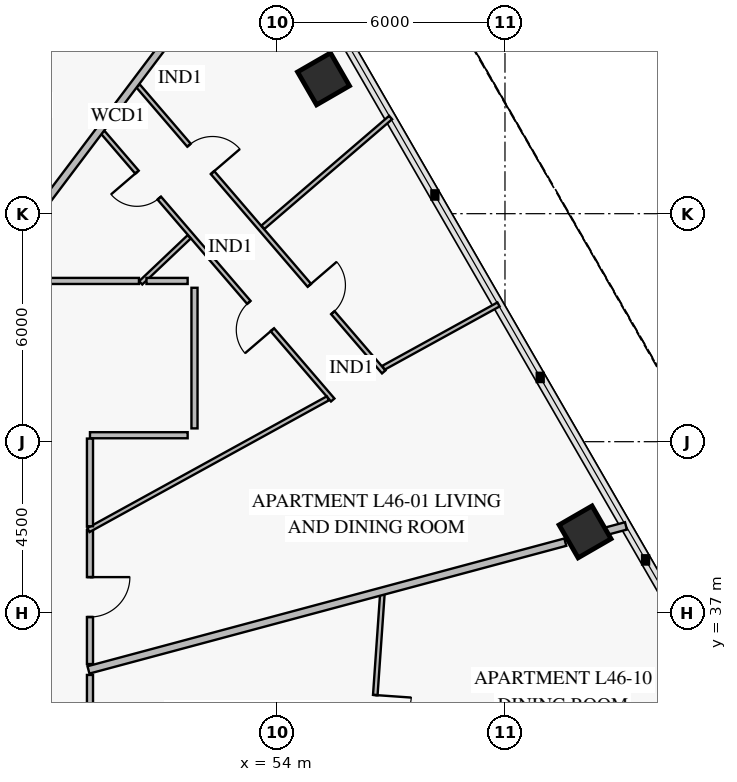
"""IFC4 building model, lengths in metres.
Left out: names, types, materials, properties, quantities, classifications, styles, units other than length and angle.
Written with IfcOpenShell. Run it as: python <this file> out.ifc"""

import sys

from ifc_helpers import new_model, si_unit, direction, frame, frame_2d, origin, origin_2d, place, context, subcontext, project, spatial, rectangle, extrude, element, fill, save


model = new_model("IFC4")
c1 = context("Model", 3, precision=1e-05, world=origin(), true_north=direction((0.0, 1.0)))
c2 = subcontext(c1, "Body", "Model", "MODEL_VIEW")
j1 = project(units=[si_unit("LENGTHUNIT", "METRE"), si_unit("PLANEANGLEUNIT", "RADIAN")], contexts=[c1])
p1 = place(None, origin())
s1 = spatial("IfcSite", under=j1, at=p1, CompositionType="ELEMENT")
p2 = place(p1, origin())
s2 = spatial("IfcBuilding", under=s1, at=p2, CompositionType="ELEMENT")
p3 = place(p2, frame((0.0, 0.0, 184.6)))
s3 = spatial("IfcBuildingStorey", under=s2, at=p3, CompositionType="ELEMENT", Elevation=184.6)
for number, where, z_axis, x_axis in (
    (1, (62.108, 39.126, 0.0), (0.0, 0.0, 1.0), (-0.5, 0.866, 0.0)),
    (2, (55.226, 51.047, 0.0), (0.0, 0.0, 1.0), (-0.5, 0.866, 0.0)),
):
    element("IfcColumn", number, at=place(p3, frame(where, z_axis=z_axis, x_axis=x_axis)), inside=s3, PredefinedType="COLUMN", context=c2, shape_type="SweptSolid", body=[
        extrude(rectangle(XDim=1.0, YDim=1.0, at=origin_2d()), origin(), (0.0, 0.0, 1.0), 3.55),
    ])
p4 = place(p3, frame((55.467, 42.597, 0.0), z_axis=(0.0, 0.0, 1.0), x_axis=(-0.651552756093, 0.758603325875, 0.0)))
e3 = element("IfcWall", 3, at=p4, inside=s3, PredefinedType="PARTITIONING", context=c2, shape_type="SweptSolid", body=[
    extrude(rectangle(XDim=9.291, YDim=0.12, at=frame_2d((4.646, 0.0))), origin(), (0.0, 0.0, 1.0), 2.9),
])
p5 = place(p4, frame((2.437, 0.0, 0.0)))
e4 = element("IfcOpeningElement", 4, at=p5, cuts=e3, PredefinedType="OPENING", context=c2, shape_type="SweptSolid", body=[
    extrude(rectangle(XDim=0.95, YDim=2.1, at=frame_2d((0.475, 1.05))), frame((0.0, 0.072, 0.0), z_axis=(0.0, -1.0, 0.0), x_axis=(1.0, 0.0, 0.0)), (0.0, 0.0, 1.0), 0.144),
])
p6 = place(p4, frame((7.005, 0.0, 0.0)))
e5 = element("IfcOpeningElement", 5, at=p6, cuts=e3, PredefinedType="OPENING", context=c2, shape_type="SweptSolid", body=[
    extrude(rectangle(XDim=0.9, YDim=2.1, at=frame_2d((0.45, 1.05))), frame((0.0, 0.072, 0.0), z_axis=(0.0, -1.0, 0.0), x_axis=(1.0, 0.0, 0.0)), (0.0, 0.0, 1.0), 0.144),
])
p7 = place(p3, frame((56.81, 43.336, 0.0), z_axis=(0.0, 0.0, 1.0), x_axis=(-0.651575392226, 0.75858388346, 0.0)))
e6 = element("IfcWall", 6, at=p7, inside=s3, PredefinedType="PARTITIONING", context=c2, shape_type="SweptSolid", body=[
    extrude(rectangle(XDim=9.92, YDim=0.12, at=frame_2d((4.96, 0.0))), origin(), (0.0, 0.0, 1.0), 2.9),
])
p8 = place(p7, frame((2.055, 0.0, 0.0)))
e7 = element("IfcOpeningElement", 7, at=p8, cuts=e6, PredefinedType="OPENING", context=c2, shape_type="SweptSolid", body=[
    extrude(rectangle(XDim=0.95, YDim=2.1, at=frame_2d((0.475, 1.05))), frame((0.0, 0.072, 0.0), z_axis=(0.0, -1.0, 0.0), x_axis=(1.0, 0.0, 0.0)), (0.0, 0.0, 1.0), 0.144),
])
p9 = place(p7, frame((6.915, 0.0, 0.0)))
e8 = element("IfcOpeningElement", 8, at=p9, cuts=e6, PredefinedType="OPENING", context=c2, shape_type="SweptSolid", body=[
    extrude(rectangle(XDim=0.95, YDim=2.1, at=frame_2d((0.475, 1.05))), frame((0.0, 0.072, 0.0), z_axis=(0.0, -1.0, 0.0), x_axis=(1.0, 0.0, 0.0)), (0.0, 0.0, 1.0), 0.144),
])
p10 = place(p3, frame((49.08, 35.648, 0.0), z_axis=(0.0, 0.0, 1.0), x_axis=(0.0, 1.0, 0.0)))
e9 = element("IfcWall", 9, at=p10, inside=s3, PredefinedType="PARTITIONING", context=c2, shape_type="SweptSolid", body=[
    extrude(rectangle(XDim=3.526, YDim=0.16, at=frame_2d((1.763, 0.0))), origin(), (0.0, 0.0, 1.0), 2.9),
])
p11 = place(p10, frame((1.238, 0.0, 0.0)))
e10 = element("IfcOpeningElement", 10, at=p11, cuts=e9, PredefinedType="OPENING", context=c2, shape_type="SweptSolid", body=[
    extrude(rectangle(XDim=1.05, YDim=2.15, at=frame_2d((0.525, 1.075))), frame((0.0, 0.092, 0.0), z_axis=(0.0, -1.0, 0.0), x_axis=(1.0, 0.0, 0.0)), (0.0, 0.0, 1.0), 0.184),
])
p12 = place(p3, frame((56.173, 28.906, 0.0), z_axis=(0.0, 0.0, 1.0), x_axis=(0.069768607492, 0.997563201711, 0.0)))
e11 = element("IfcWall", 11, at=p12, inside=s3, PredefinedType="PARTITIONING", context=c2, shape_type="SweptSolid", body=[
    extrude(rectangle(XDim=8.591, YDim=0.12, at=frame_2d((4.295, 0.0))), origin(), (0.0, 0.0, 1.0), 3.55),
])
p13 = place(p12, frame((0.936, 0.0, 0.0)))
e12 = element("IfcOpeningElement", 12, at=p13, cuts=e11, PredefinedType="OPENING", context=c2, shape_type="SweptSolid", body=[
    extrude(rectangle(XDim=0.95, YDim=2.1, at=frame_2d((0.475, 1.05))), frame((0.0, 0.072, 0.0), z_axis=(0.0, -1.0, 0.0), x_axis=(1.0, 0.0, 0.0)), (0.0, 0.0, 1.0), 0.144),
])
p14 = place(p12, frame((4.991, 0.0, 0.0)))
e13 = element("IfcOpeningElement", 13, at=p14, cuts=e11, PredefinedType="OPENING", context=c2, shape_type="SweptSolid", body=[
    extrude(rectangle(XDim=0.95, YDim=2.1, at=frame_2d((0.475, 1.05))), frame((0.0, 0.072, 0.0), z_axis=(0.0, -1.0, 0.0), x_axis=(1.0, 0.0, 0.0)), (0.0, 0.0, 1.0), 0.144),
])
p15 = place(p3, frame((49.08, 30.8, 0.0), z_axis=(0.0, 0.0, 1.0), x_axis=(0.0, 1.0, 0.0)))
e14 = element("IfcWall", 14, at=p15, inside=s3, PredefinedType="PARTITIONING", context=c2, shape_type="SweptSolid", body=[
    extrude(rectangle(XDim=4.562, YDim=0.16, at=frame_2d((2.281, 0.0))), origin(), (0.0, 0.0, 1.0), 3.55),
])
p16 = place(p15, frame((1.756, 0.0, 0.0)))
e15 = element("IfcOpeningElement", 15, at=p16, cuts=e14, PredefinedType="OPENING", context=c2, shape_type="SweptSolid", body=[
    extrude(rectangle(XDim=1.05, YDim=2.15, at=frame_2d((0.525, 1.075))), frame((0.0, 0.092, 0.0), z_axis=(0.0, -1.0, 0.0), x_axis=(1.0, 0.0, 0.0)), (0.0, 0.0, 1.0), 0.184),
])
p17 = place(p3, frame((49.04, 35.494, 0.0), z_axis=(0.0, 0.0, 1.0), x_axis=(0.965926995019, 0.258814683304, 0.0)))
e16 = element("IfcWall", 16, at=p17, inside=s3, PredefinedType="PARTITIONING", context=c2, shape_type="SweptSolid", body=[
    extrude(rectangle(XDim=12.99, YDim=0.2, at=frame_2d((6.495, 0.0))), origin(), (0.0, 0.0, 1.0), 2.9),
])
p18 = place(p3, frame((62.628, 39.135, 0.0), z_axis=(0.0, 0.0, 1.0), x_axis=(0.965881701481, 0.258983665013, 0.0)))
e17 = element("IfcWall", 17, at=p18, inside=s3, PredefinedType="PARTITIONING", context=c2, shape_type="SweptSolid", body=[
    extrude(rectangle(XDim=0.575, YDim=0.2, at=frame_2d((0.288, 0.0))), origin(), (0.0, 0.0, 1.0), 3.55),
])
p19 = place(p3, frame((50.415, 45.68, 0.0), z_axis=(0.0, 0.0, 1.0), x_axis=(0.725405017461, 0.688322279635, 0.0)))
e18 = element("IfcWall", 18, at=p19, inside=s3, PredefinedType="PARTITIONING", context=c2, shape_type="SweptSolid", body=[
    extrude(rectangle(XDim=1.758, YDim=0.12, at=frame_2d((0.879, 0.0))), origin(), (0.0, 0.0, 1.0), 3.15),
])
p20 = place(p3, frame((53.63, 47.143, 0.0), z_axis=(0.0, 0.0, 1.0), x_axis=(0.758610544746, 0.651544351062, 0.0)))
e19 = element("IfcWall", 19, at=p20, inside=s3, PredefinedType="PARTITIONING", context=c2, shape_type="SweptSolid", body=[
    extrude(rectangle(XDim=4.431, YDim=0.12, at=frame_2d((2.215, 0.0))), origin(), (0.0, 0.0, 1.0), 2.87),
])
p21 = place(p3, frame((49.038, 39.174, 0.0), z_axis=(0.0, 0.0, 1.0), x_axis=(0.876137059661, 0.482062083853, 0.0)))
e20 = element("IfcWall", 20, at=p21, inside=s3, PredefinedType="PARTITIONING", context=c2, shape_type="SweptSolid", body=[
    extrude(rectangle(XDim=7.192, YDim=0.12, at=frame_2d((3.596, 0.0))), origin(), (0.0, 0.0, 1.0), 3.15),
])
p22 = place(p3, frame((56.804, 43.447, 0.0), z_axis=(0.0, 0.0, 1.0), x_axis=(0.876100956411, 0.482127694886, 0.0)))
e21 = element("IfcWall", 21, at=p22, inside=s3, PredefinedType="PARTITIONING", context=c2, shape_type="SweptSolid", body=[
    extrude(rectangle(XDim=3.454, YDim=0.12, at=frame_2d((1.727, 0.0))), origin(), (0.0, 0.0, 1.0), 2.87),
])
p23 = place(p3, frame((46.316, 45.69, 0.0), z_axis=(0.0, 0.0, 1.0), x_axis=(0.601811441108, 0.798638209299, 0.0)))
e22 = element("IfcWall", 22, at=p23, inside=s3, PredefinedType="PARTITIONING", context=c2, shape_type="SweptSolid", body=[
    extrude(rectangle(XDim=12.389, YDim=0.2, at=frame_2d((6.194, 0.0))), origin(), (0.0, 0.0, 1.0), 2.87),
])
p24 = place(p3, frame((51.83, 41.85, 0.0), z_axis=(0.0, 0.0, 1.0), x_axis=(0.0, 1.0, 0.0)))
e23 = element("IfcWall", 23, at=p24, inside=s3, PredefinedType="PARTITIONING", context=c2, shape_type="SweptSolid", body=[
    extrude(rectangle(XDim=3.7, YDim=0.16, at=frame_2d((1.85, 0.0))), origin(), (0.0, 0.0, 1.0), 3.15),
])
p25 = place(p3, frame((49.08, 41.67, 0.0), z_axis=(0.0, 0.0, 1.0), x_axis=(1.0, 0.0, 0.0)))
e24 = element("IfcWall", 24, at=p25, inside=s3, PredefinedType="PARTITIONING", context=c2, shape_type="SweptSolid", body=[
    extrude(rectangle(XDim=2.57, YDim=0.16, at=frame_2d((1.285, 0.0))), origin(), (0.0, 0.0, 1.0), 3.55),
])
p26 = place(p3, frame((49.08, 39.274, 0.0), z_axis=(0.0, 0.0, 1.0), x_axis=(0.0, 1.0, 0.0)))
e25 = element("IfcWall", 25, at=p26, inside=s3, PredefinedType="PARTITIONING", context=c2, shape_type="SweptSolid", body=[
    extrude(rectangle(XDim=2.308, YDim=0.16, at=frame_2d((1.154, 0.0))), origin(), (0.0, 0.0, 1.0), 3.55),
])
p27 = place(p3, frame((51.65, 45.73, 0.0), z_axis=(0.0, 0.0, 1.0), x_axis=(-1.0, 0.0, 0.0)))
e26 = element("IfcWall", 26, at=p27, inside=s3, PredefinedType="PARTITIONING", context=c2, shape_type="SweptSolid", body=[
    extrude(rectangle(XDim=1.083, YDim=0.16, at=frame_2d((0.542, 0.0))), origin(), (0.0, 0.0, 1.0), 3.15),
])
p28 = place(p3, frame((50.369, 45.73, 0.0), z_axis=(0.0, 0.0, 1.0), x_axis=(-1.0, 0.0, 0.0)))
e27 = element("IfcWall", 27, at=p28, inside=s3, PredefinedType="PARTITIONING", context=c2, shape_type="SweptSolid", body=[
    extrude(rectangle(XDim=3.808, YDim=0.16, at=frame_2d((1.904, 0.0))), origin(), (0.0, 0.0, 1.0), 2.9),
])
p29 = place(p5, origin())
e28 = element("IfcDoor", 28, at=p29, inside=s3, OperationType="SINGLE_SWING_LEFT", PredefinedType="DOOR", context=c2, shape_type="SweptSolid", body=[
    extrude(rectangle(XDim=0.95, YDim=2.1, at=frame_2d((0.475, 1.05))), frame((0.0, 0.025, 0.0), z_axis=(0.0, -1.0, 0.0), x_axis=(1.0, 0.0, 0.0)), (0.0, 0.0, 1.0), 0.05),
])
fill(e4, e28)
p30 = place(p6, origin())
e29 = element("IfcDoor", 29, at=p30, inside=s3, OperationType="SINGLE_SWING_RIGHT", PredefinedType="DOOR", context=c2, shape_type="SweptSolid", body=[
    extrude(rectangle(XDim=0.9, YDim=2.1, at=frame_2d((0.45, 1.05))), frame((0.0, 0.025, 0.0), z_axis=(0.0, -1.0, 0.0), x_axis=(1.0, 0.0, 0.0)), (0.0, 0.0, 1.0), 0.05),
])
fill(e5, e29)
p31 = place(p8, frame((0.95, 0.0, 0.0), z_axis=(0.0, 0.0, 1.0), x_axis=(-1.0, 0.0, 0.0)))
e30 = element("IfcDoor", 30, at=p31, inside=s3, OperationType="SINGLE_SWING_LEFT", PredefinedType="DOOR", context=c2, shape_type="SweptSolid", body=[
    extrude(rectangle(XDim=0.95, YDim=2.1, at=frame_2d((0.475, 1.05))), frame((0.0, 0.025, 0.0), z_axis=(0.0, -1.0, 0.0), x_axis=(1.0, 0.0, 0.0)), (0.0, 0.0, 1.0), 0.05),
])
fill(e7, e30)
p32 = place(p9, frame((0.95, 0.0, 0.0), z_axis=(0.0, 0.0, 1.0), x_axis=(-1.0, 0.0, 0.0)))
e31 = element("IfcDoor", 31, at=p32, inside=s3, OperationType="SINGLE_SWING_RIGHT", PredefinedType="DOOR", context=c2, shape_type="SweptSolid", body=[
    extrude(rectangle(XDim=0.95, YDim=2.1, at=frame_2d((0.475, 1.05))), frame((0.0, 0.025, 0.0), z_axis=(0.0, -1.0, 0.0), x_axis=(1.0, 0.0, 0.0)), (0.0, 0.0, 1.0), 0.05),
])
fill(e8, e31)
p33 = place(p11, frame((1.05, 0.0, 0.0), z_axis=(0.0, 0.0, 1.0), x_axis=(-1.0, 0.0, 0.0)))
e32 = element("IfcDoor", 32, at=p33, inside=s3, OperationType="SINGLE_SWING_LEFT", PredefinedType="DOOR", context=c2, shape_type="SweptSolid", body=[
    extrude(rectangle(XDim=1.05, YDim=2.15, at=frame_2d((0.525, 1.075))), frame((0.0, 0.025, 0.0), z_axis=(0.0, -1.0, 0.0), x_axis=(1.0, 0.0, 0.0)), (0.0, 0.0, 1.0), 0.05),
])
fill(e10, e32)
p34 = place(p14, frame((0.95, 0.0, 0.0), z_axis=(0.0, 0.0, 1.0), x_axis=(-1.0, 0.0, 0.0)))
e33 = element("IfcDoor", 33, at=p34, inside=s3, OperationType="SINGLE_SWING_LEFT", PredefinedType="DOOR", context=c2, shape_type="SweptSolid", body=[
    extrude(rectangle(XDim=0.95, YDim=2.1, at=frame_2d((0.475, 1.05))), frame((0.0, 0.025, 0.0), z_axis=(0.0, -1.0, 0.0), x_axis=(1.0, 0.0, 0.0)), (0.0, 0.0, 1.0), 0.05),
])
fill(e13, e33)
save(model, sys.argv[1])
